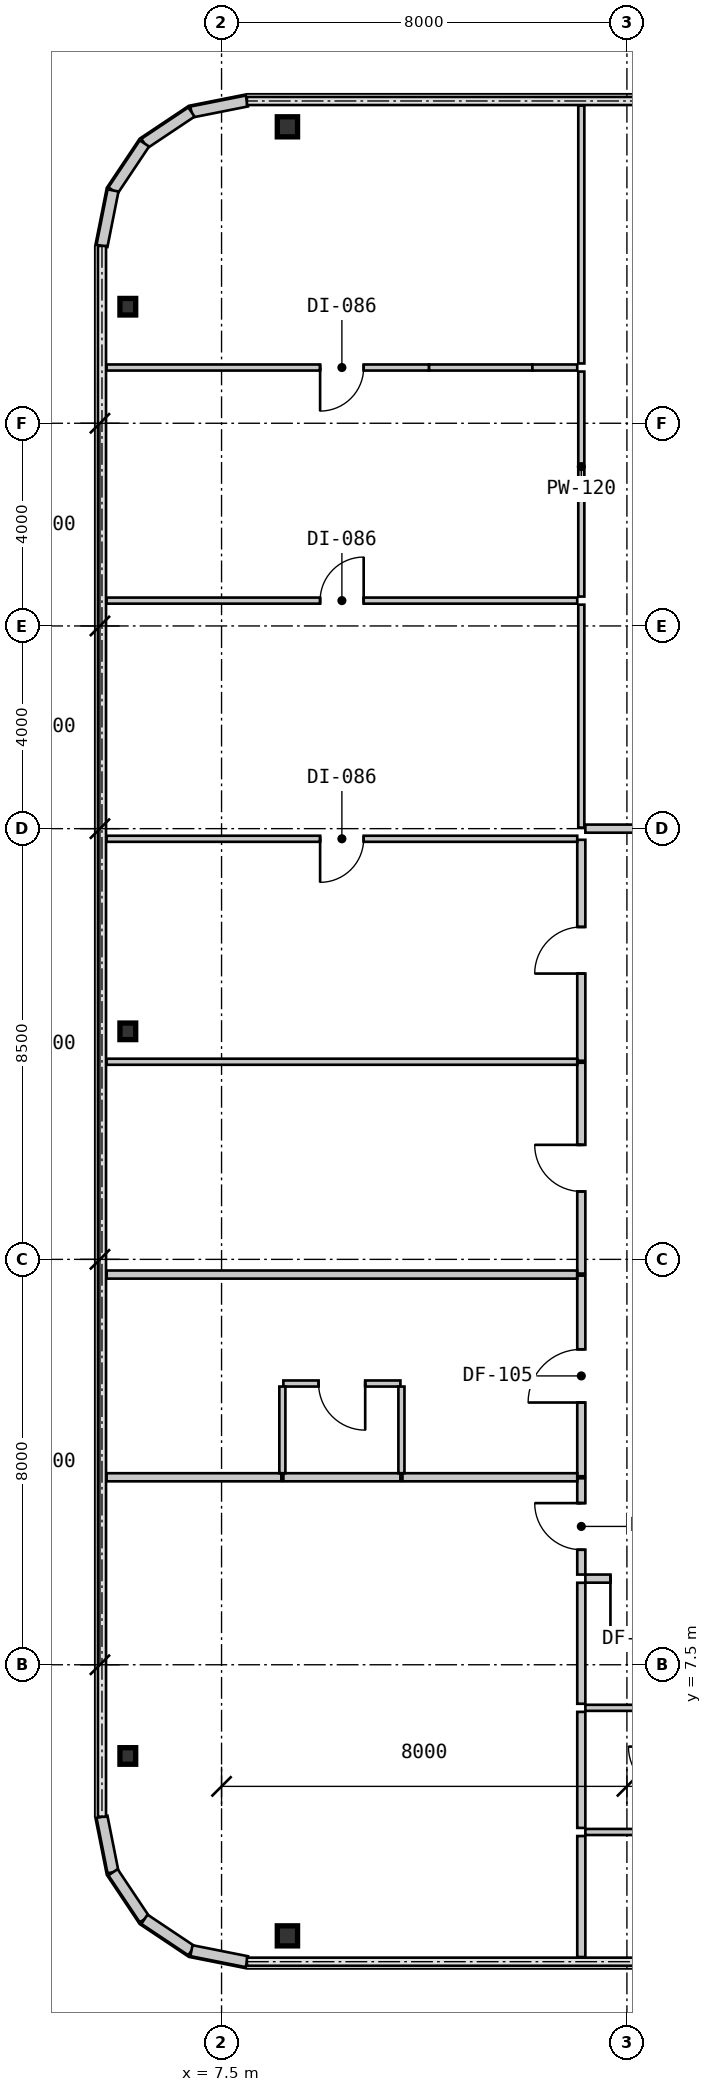
"""IFC4 building model, lengths in metres.
Left out: names, types, materials, properties, quantities, classifications, styles, units other than length and angle.
Written with IfcOpenShell. Run it as: python <this file> out.ifc"""

import sys

from ifc_helpers import new_model, si_unit, direction, frame, frame_2d, origin, origin_2d, place, context, subcontext, project, spatial, rectangle, i_section, extrude, source, transform, mapped, element, fill, save


model = new_model("IFC4")
c1 = context("Model", 3, precision=1e-05, world=origin(), true_north=direction((0.0, 1.0)))
c2 = subcontext(c1, "Body", "Model", "MODEL_VIEW")
j1 = project(units=[si_unit("LENGTHUNIT", "METRE"), si_unit("PLANEANGLEUNIT", "RADIAN")], contexts=[c1])
p1 = place(None, origin())
s1 = spatial("IfcSite", under=j1, at=p1, CompositionType="ELEMENT")
p2 = place(p1, origin())
s2 = spatial("IfcBuilding", under=s1, at=p2, CompositionType="ELEMENT")
p3 = place(p2, frame((0.0, 0.0, 19.95)))
s3 = spatial("IfcBuildingStorey", under=s2, at=p3, CompositionType="ELEMENT", Elevation=19.95)
m1 = source(origin(), c2, "Body", "SweptSolid", [
    extrude(i_section(OverallWidth=0.4, OverallDepth=0.396, WebThickness=0.022, FlangeThickness=0.034, at=origin_2d()), origin(), (0.0, 0.0, 1.0), 3.15),
])
for number, where, z_axis, x_axis in (
    (1, (8.8, 2.15, 0.0), (0.0, 0.0, 1.0), (1.0, 0.0, 0.0)),
    (2, (8.8, 37.85, 0.0), (0.0, 0.0, 1.0), (1.0, 0.0, 0.0)),
):
    element("IfcColumn", number, at=place(p3, frame(where, z_axis=z_axis, x_axis=x_axis)), inside=s3, PredefinedType="COLUMN", context=c2, shape_type="MappedRepresentation", body=[
        mapped(m1, transform((0.0, 0.0, 0.0), scale=1.0)),
    ])
m2 = source(origin(), c2, "Body", "SweptSolid", [
    extrude(i_section(OverallWidth=0.311, OverallDepth=0.327, WebThickness=0.016, FlangeThickness=0.025, at=origin_2d()), origin(), (0.0, 0.0, 1.0), 3.15),
])
for number, where, z_axis, x_axis in (
    (3, (5.65, 5.7, 0.0), (0.0, 0.0, 1.0), (1.0, 0.0, 0.0)),
    (4, (5.65, 20.0, 0.0), (0.0, 0.0, 1.0), (1.0, 0.0, 0.0)),
    (5, (5.65, 34.3, 0.0), (0.0, 0.0, 1.0), (1.0, 0.0, 0.0)),
):
    element("IfcColumn", number, at=place(p3, frame(where, z_axis=z_axis, x_axis=x_axis)), inside=s3, PredefinedType="COLUMN", context=c2, shape_type="MappedRepresentation", body=[
        mapped(m2, transform((0.0, 0.0, 0.0), scale=1.0)),
    ])
m3 = source(origin(), c2, "Body", "SweptSolid", [
    extrude(rectangle(XDim=1.116, YDim=0.22, at=frame_2d((0.558, 0.0))), origin(), (0.0, 0.0, 1.0), 2.93),
])
for number, where, z_axis, x_axis in (
    (6, (8.0, 38.36, 0.0), (0.0, 0.0, 1.0), (-0.981, -0.195, 0.0)),
    (7, (6.906, 38.142, 0.0), (0.0, 0.0, 1.0), (-0.831, -0.556, 0.0)),
    (8, (5.978, 37.522, 0.0), (0.0, 0.0, 1.0), (-0.556, -0.831, 0.0)),
    (9, (5.358, 36.594, 0.0), (0.0, 0.0, 1.0), (-0.195, -0.981, 0.0)),
    (10, (5.14, 4.5, 0.0), (0.0, 0.0, 1.0), (0.195, -0.981, 0.0)),
    (11, (5.358, 3.406, 0.0), (0.0, 0.0, 1.0), (0.556, -0.831, 0.0)),
    (12, (5.978, 2.478, 0.0), (0.0, 0.0, 1.0), (0.831, -0.556, 0.0)),
    (13, (6.906, 1.858, 0.0), (0.0, 0.0, 1.0), (0.981, -0.195, 0.0)),
):
    element("IfcWall", number, at=place(p3, frame(where, z_axis=z_axis, x_axis=x_axis)), inside=s3, PredefinedType="SOLIDWALL", context=c2, shape_type="MappedRepresentation", body=[
        mapped(m3, transform((0.0, 0.0, 0.0), scale=1.0)),
    ])
m4 = source(origin(), c2, "Body", "SweptSolid", [
    extrude(rectangle(XDim=2.04, YDim=0.16, at=frame_2d((1.02, 0.0))), origin(), (0.0, 0.0, 1.0), 2.93),
])
p4 = place(p3, frame((16.72, 9.2, 0.0), z_axis=(0.0, 0.0, 1.0), x_axis=(-1.0, 0.0, 0.0)))
e14 = element("IfcWall", 14, at=p4, inside=s3, PredefinedType="PARTITIONING", context=c2, shape_type="MappedRepresentation", body=[
    mapped(m4, transform((0.0, 0.0, 0.0), scale=1.0)),
])
m5 = source(origin(), c2, "Body", "SweptSolid", [
    extrude(rectangle(XDim=1.05, YDim=2.1, at=frame_2d((0.525, 1.05))), frame((0.0, 0.09, 0.0), z_axis=(0.0, -1.0, 0.0), x_axis=(1.0, 0.0, 0.0)), (0.0, 0.0, 1.0), 0.18),
])
p5 = place(p4, frame((0.495, 0.0, 0.0)))
e15 = element("IfcOpeningElement", 15, at=p5, cuts=e14, PredefinedType="OPENING", context=c2, shape_type="MappedRepresentation", body=[
    mapped(m5, transform((0.0, 0.0, 0.0), scale=1.0)),
])
m6 = source(origin(), c2, "Body", "SweptSolid", [
    extrude(rectangle(XDim=1.9, YDim=0.16, at=frame_2d((0.95, 0.0))), origin(), (0.0, 0.0, 1.0), 2.93),
])
p6 = place(p3, frame((14.6, 9.28, 0.0), z_axis=(0.0, 0.0, 1.0), x_axis=(0.0, 1.0, 0.0)))
e16 = element("IfcWall", 16, at=p6, inside=s3, PredefinedType="PARTITIONING", context=c2, shape_type="MappedRepresentation", body=[
    mapped(m6, transform((0.0, 0.0, 0.0), scale=1.0)),
])
m7 = source(origin(), c2, "Body", "SweptSolid", [
    extrude(rectangle(XDim=0.92, YDim=2.1, at=frame_2d((0.46, 1.05))), frame((0.0, 0.09, 0.0), z_axis=(0.0, -1.0, 0.0), x_axis=(1.0, 0.0, 0.0)), (0.0, 0.0, 1.0), 0.18),
])
p7 = place(p6, frame((0.49, 0.0, 0.0)))
e17 = element("IfcOpeningElement", 17, at=p7, cuts=e16, PredefinedType="OPENING", context=c2, shape_type="MappedRepresentation", body=[
    mapped(m7, transform((0.0, 0.0, 0.0), scale=1.0)),
])
m8 = source(origin(), c2, "Body", "SweptSolid", [
    extrude(rectangle(XDim=3.959, YDim=0.16, at=frame_2d((1.98, 0.0))), origin(), (0.0, 0.0, 1.0), 2.93),
])
p8 = place(p3, frame((14.6, 11.22, 0.0), z_axis=(0.0, 0.0, 1.0), x_axis=(0.0, 1.0, 0.0)))
e18 = element("IfcWall", 18, at=p8, inside=s3, PredefinedType="PARTITIONING", context=c2, shape_type="MappedRepresentation", body=[
    mapped(m8, transform((0.0, 0.0, 0.0), scale=1.0)),
])
p9 = place(p8, frame((1.455, 0.0, 0.0)))
e19 = element("IfcOpeningElement", 19, at=p9, cuts=e18, PredefinedType="OPENING", context=c2, shape_type="MappedRepresentation", body=[
    mapped(m5, transform((0.0, 0.0, 0.0), scale=1.0)),
])
m9 = source(origin(), c2, "Body", "SweptSolid", [
    extrude(rectangle(XDim=4.16, YDim=0.16, at=frame_2d((2.08, 0.0))), origin(), (0.0, 0.0, 1.0), 2.93),
])
p10 = place(p3, frame((14.6, 15.22, 0.0), z_axis=(0.0, 0.0, 1.0), x_axis=(0.0, 1.0, 0.0)))
e20 = element("IfcWall", 20, at=p10, inside=s3, PredefinedType="PARTITIONING", context=c2, shape_type="MappedRepresentation", body=[
    mapped(m9, transform((0.0, 0.0, 0.0), scale=1.0)),
])
p11 = place(p10, frame((1.62, 0.0, 0.0)))
e21 = element("IfcOpeningElement", 21, at=p11, cuts=e20, PredefinedType="OPENING", context=c2, shape_type="MappedRepresentation", body=[
    mapped(m7, transform((0.0, 0.0, 0.0), scale=1.0)),
])
m10 = source(origin(), c2, "Body", "SweptSolid", [
    extrude(rectangle(XDim=4.36, YDim=0.16, at=frame_2d((2.18, 0.0))), origin(), (0.0, 0.0, 1.0), 2.93),
])
p12 = place(p3, frame((14.6, 19.42, 0.0), z_axis=(0.0, 0.0, 1.0), x_axis=(0.0, 1.0, 0.0)))
e22 = element("IfcWall", 22, at=p12, inside=s3, PredefinedType="PARTITIONING", context=c2, shape_type="MappedRepresentation", body=[
    mapped(m10, transform((0.0, 0.0, 0.0), scale=1.0)),
])
p13 = place(p12, frame((1.72, 0.0, 0.0)))
e23 = element("IfcOpeningElement", 23, at=p13, cuts=e22, PredefinedType="OPENING", context=c2, shape_type="MappedRepresentation", body=[
    mapped(m7, transform((0.0, 0.0, 0.0), scale=1.0)),
])
m11 = source(origin(), c2, "Body", "SweptSolid", [
    extrude(rectangle(XDim=4.13, YDim=0.16, at=frame_2d((2.065, 0.0))), origin(), (0.0, 0.0, 1.0), 2.93),
])
p14 = place(p3, frame((14.68, 24.0, 0.0), z_axis=(0.0, 0.0, 1.0), x_axis=(1.0, 0.0, 0.0)))
e24 = element("IfcWall", 24, at=p14, inside=s3, PredefinedType="PARTITIONING", context=c2, shape_type="MappedRepresentation", body=[
    mapped(m11, transform((0.0, 0.0, 0.0), scale=1.0)),
])
p15 = place(p14, frame((1.69, 0.0, 0.0)))
e25 = element("IfcOpeningElement", 25, at=p15, cuts=e24, PredefinedType="OPENING", context=c2, shape_type="MappedRepresentation", body=[
    mapped(m7, transform((0.0, 0.0, 0.0), scale=1.0)),
])
m12 = source(origin(), c2, "Body", "SweptSolid", [
    extrude(rectangle(XDim=1.75, YDim=0.12, at=frame_2d((0.875, 0.0))), origin(), (0.0, 0.0, 1.0), 2.93),
])
for number, where, z_axis, x_axis in (
    (26, (14.68, 4.2, 0.0), (0.0, 0.0, 1.0), (1.0, 0.0, 0.0)),
    (27, (16.43, 6.65, 0.0), (0.0, 0.0, 1.0), (-1.0, 0.0, 0.0)),
):
    element("IfcWall", number, at=place(p3, frame(where, z_axis=z_axis, x_axis=x_axis)), inside=s3, PredefinedType="PARTITIONING", context=c2, shape_type="MappedRepresentation", body=[
        mapped(m12, transform((0.0, 0.0, 0.0), scale=1.0)),
    ])
m13 = source(origin(), c2, "Body", "SweptSolid", [
    extrude(rectangle(XDim=2.388, YDim=0.16, at=frame_2d((1.194, 0.0))), origin(), (0.0, 0.0, 1.0), 2.93),
])
p16 = place(p3, frame((14.6, 1.732, 0.0), z_axis=(0.0, 0.0, 1.0), x_axis=(0.0, 1.0, 0.0)))
e28 = element("IfcWall", 28, at=p16, inside=s3, PredefinedType="PARTITIONING", context=c2, shape_type="MappedRepresentation", body=[
    mapped(m13, transform((0.0, 0.0, 0.0), scale=1.0)),
])
m14 = source(origin(), c2, "Body", "SweptSolid", [
    extrude(rectangle(XDim=2.388, YDim=0.16, at=frame_2d((1.194, 0.0))), origin(), (0.0, 0.0, 1.0), 2.93),
])
p17 = place(p3, frame((14.6, 6.73, 0.0), z_axis=(0.0, 0.0, 1.0), x_axis=(0.0, 1.0, 0.0)))
e29 = element("IfcWall", 29, at=p17, inside=s3, PredefinedType="PARTITIONING", context=c2, shape_type="MappedRepresentation", body=[
    mapped(m14, transform((0.0, 0.0, 0.0), scale=1.0)),
])
m15 = source(origin(), c2, "Body", "SweptSolid", [
    extrude(rectangle(XDim=2.29, YDim=0.16, at=frame_2d((1.145, 0.0))), origin(), (0.0, 0.0, 1.0), 2.93),
])
p18 = place(p3, frame((14.6, 4.28, 0.0), z_axis=(0.0, 0.0, 1.0), x_axis=(0.0, 1.0, 0.0)))
e30 = element("IfcWall", 30, at=p18, inside=s3, PredefinedType="PARTITIONING", context=c2, shape_type="MappedRepresentation", body=[
    mapped(m15, transform((0.0, 0.0, 0.0), scale=1.0)),
])
m16 = source(origin(), c2, "Body", "SweptSolid", [
    extrude(rectangle(XDim=3.45, YDim=0.16, at=frame_2d((1.725, 0.0))), origin(), (0.0, 0.0, 1.0), 2.93),
])
for number, where, z_axis, x_axis in (
    (31, (5.23, 11.2, 0.0), (0.0, 0.0, 1.0), (1.0, 0.0, 0.0)),
    (32, (11.07, 11.2, 0.0), (0.0, 0.0, 1.0), (1.0, 0.0, 0.0)),
):
    element("IfcWall", number, at=place(p3, frame(where, z_axis=z_axis, x_axis=x_axis)), inside=s3, PredefinedType="PARTITIONING", context=c2, shape_type="MappedRepresentation", body=[
        mapped(m16, transform((0.0, 0.0, 0.0), scale=1.0)),
    ])
m17 = source(origin(), c2, "Body", "SweptSolid", [
    extrude(rectangle(XDim=2.31, YDim=0.16, at=frame_2d((1.155, 0.0))), origin(), (0.0, 0.0, 1.0), 2.93),
])
p19 = place(p3, frame((8.72, 11.2, 0.0), z_axis=(0.0, 0.0, 1.0), x_axis=(1.0, 0.0, 0.0)))
e33 = element("IfcWall", 33, at=p19, inside=s3, PredefinedType="PARTITIONING", context=c2, shape_type="MappedRepresentation", body=[
    mapped(m17, transform((0.0, 0.0, 0.0), scale=1.0)),
])
m18 = source(origin(), c2, "Body", "SweptSolid", [
    extrude(rectangle(XDim=2.31, YDim=0.12, at=frame_2d((1.155, 0.0))), origin(), (0.0, 0.0, 1.0), 2.93),
])
p20 = place(p3, frame((11.03, 13.05, 0.0), z_axis=(0.0, 0.0, 1.0), x_axis=(-1.0, 0.0, 0.0)))
e34 = element("IfcWall", 34, at=p20, inside=s3, PredefinedType="PARTITIONING", context=c2, shape_type="MappedRepresentation", body=[
    mapped(m18, transform((0.0, 0.0, 0.0), scale=1.0)),
])
m19 = source(origin(), c2, "Body", "SweptSolid", [
    extrude(rectangle(XDim=0.92, YDim=2.1, at=frame_2d((0.46, 1.05))), frame((0.0, 0.07, 0.0), z_axis=(0.0, -1.0, 0.0), x_axis=(1.0, 0.0, 0.0)), (0.0, 0.0, 1.0), 0.14),
])
p21 = place(p20, frame((0.695, 0.0, 0.0)))
e35 = element("IfcOpeningElement", 35, at=p21, cuts=e34, PredefinedType="OPENING", context=c2, shape_type="MappedRepresentation", body=[
    mapped(m19, transform((0.0, 0.0, 0.0), scale=1.0)),
])
m20 = source(origin(), c2, "Body", "SweptSolid", [
    extrude(rectangle(XDim=1.71, YDim=0.12, at=frame_2d((0.855, 0.0))), origin(), (0.0, 0.0, 1.0), 2.93),
])
for number, where, z_axis, x_axis in (
    (36, (8.7, 12.99, 0.0), (0.0, 0.0, 1.0), (0.0, -1.0, 0.0)),
    (37, (11.05, 11.28, 0.0), (0.0, 0.0, 1.0), (0.0, 1.0, 0.0)),
):
    element("IfcWall", number, at=place(p3, frame(where, z_axis=z_axis, x_axis=x_axis)), inside=s3, PredefinedType="PARTITIONING", context=c2, shape_type="MappedRepresentation", body=[
        mapped(m20, transform((0.0, 0.0, 0.0), scale=1.0)),
    ])
m21 = source(origin(), c2, "Body", "SweptSolid", [
    extrude(rectangle(XDim=9.286, YDim=0.16, at=frame_2d((4.643, 0.0))), origin(), (0.0, 0.0, 1.0), 2.93),
])
p22 = place(p3, frame((5.232, 15.2, 0.0), z_axis=(0.0, 0.0, 1.0), x_axis=(1.0, 0.0, 0.0)))
e38 = element("IfcWall", 38, at=p22, inside=s3, PredefinedType="PARTITIONING", context=c2, shape_type="MappedRepresentation", body=[
    mapped(m21, transform((0.0, 0.0, 0.0), scale=1.0)),
])
m22 = source(origin(), c2, "Body", "SweptSolid", [
    extrude(rectangle(XDim=9.29, YDim=0.12, at=frame_2d((4.645, 0.0))), origin(), (0.0, 0.0, 1.0), 2.93),
])
p23 = place(p3, frame((5.23, 19.4, 0.0), z_axis=(0.0, 0.0, 1.0), x_axis=(1.0, 0.0, 0.0)))
e39 = element("IfcWall", 39, at=p23, inside=s3, PredefinedType="PARTITIONING", context=c2, shape_type="MappedRepresentation", body=[
    mapped(m22, transform((0.0, 0.0, 0.0), scale=1.0)),
])
p24 = place(p3, frame((5.23, 23.8, 0.0), z_axis=(0.0, 0.0, 1.0), x_axis=(1.0, 0.0, 0.0)))
e40 = element("IfcWall", 40, at=p24, inside=s3, PredefinedType="PARTITIONING", context=c2, shape_type="MappedRepresentation", body=[
    mapped(m22, transform((0.0, 0.0, 0.0), scale=1.0)),
])
m23 = source(origin(), c2, "Body", "SweptSolid", [
    extrude(rectangle(XDim=0.86, YDim=2.1, at=frame_2d((0.43, 1.05))), frame((0.0, 0.07, 0.0), z_axis=(0.0, -1.0, 0.0), x_axis=(1.0, 0.0, 0.0)), (0.0, 0.0, 1.0), 0.14),
])
p25 = place(p24, frame((4.215, 0.0, 0.0)))
e41 = element("IfcOpeningElement", 41, at=p25, cuts=e40, PredefinedType="OPENING", context=c2, shape_type="MappedRepresentation", body=[
    mapped(m23, transform((0.0, 0.0, 0.0), scale=1.0)),
])
p26 = place(p3, frame((5.23, 28.5, 0.0), z_axis=(0.0, 0.0, 1.0), x_axis=(1.0, 0.0, 0.0)))
e42 = element("IfcWall", 42, at=p26, inside=s3, PredefinedType="PARTITIONING", context=c2, shape_type="MappedRepresentation", body=[
    mapped(m22, transform((0.0, 0.0, 0.0), scale=1.0)),
])
p27 = place(p26, frame((4.215, 0.0, 0.0)))
e43 = element("IfcOpeningElement", 43, at=p27, cuts=e42, PredefinedType="OPENING", context=c2, shape_type="MappedRepresentation", body=[
    mapped(m23, transform((0.0, 0.0, 0.0), scale=1.0)),
])
m24 = source(origin(), c2, "Body", "SweptSolid", [
    extrude(rectangle(XDim=4.4, YDim=0.12, at=frame_2d((2.2, 0.0))), origin(), (0.0, 0.0, 1.0), 2.93),
])
p28 = place(p3, frame((14.6, 28.42, 0.0), z_axis=(0.0, 0.0, 1.0), x_axis=(0.0, -1.0, 0.0)))
e44 = element("IfcWall", 44, at=p28, inside=s3, PredefinedType="PARTITIONING", context=c2, shape_type="MappedRepresentation", body=[
    mapped(m24, transform((0.0, 0.0, 0.0), scale=1.0)),
])
m25 = source(origin(), c2, "Body", "SweptSolid", [
    extrude(rectangle(XDim=6.365, YDim=0.12, at=frame_2d((3.183, 0.0))), origin(), (0.0, 0.0, 1.0), 2.93),
])
p29 = place(p3, frame((5.23, 33.1, 0.0), z_axis=(0.0, 0.0, 1.0), x_axis=(1.0, 0.0, 0.0)))
e45 = element("IfcWall", 45, at=p29, inside=s3, PredefinedType="PARTITIONING", context=c2, shape_type="MappedRepresentation", body=[
    mapped(m25, transform((0.0, 0.0, 0.0), scale=1.0)),
])
p30 = place(p29, frame((4.215, 0.0, 0.0)))
e46 = element("IfcOpeningElement", 46, at=p30, cuts=e45, PredefinedType="OPENING", context=c2, shape_type="MappedRepresentation", body=[
    mapped(m23, transform((0.0, 0.0, 0.0), scale=1.0)),
])
m26 = source(origin(), c2, "Body", "SweptSolid", [
    extrude(rectangle(XDim=2.04, YDim=0.12, at=frame_2d((1.02, 0.0))), origin(), (0.0, 0.0, 1.0), 2.328),
])
p31 = place(p3, frame((11.595, 33.1, 0.0), z_axis=(0.0, 0.0, 1.0), x_axis=(1.0, 0.0, 0.0)))
e47 = element("IfcWall", 47, at=p31, inside=s3, PredefinedType="PARTITIONING", context=c2, shape_type="MappedRepresentation", body=[
    mapped(m26, transform((0.0, 0.0, 0.0), scale=1.0)),
])
m27 = source(origin(), c2, "Body", "SweptSolid", [
    extrude(rectangle(XDim=0.885, YDim=0.12, at=frame_2d((0.442, 0.0))), origin(), (0.0, 0.0, 1.0), 2.93),
])
p32 = place(p3, frame((13.635, 33.1, 0.0), z_axis=(0.0, 0.0, 1.0), x_axis=(1.0, 0.0, 0.0)))
e48 = element("IfcWall", 48, at=p32, inside=s3, PredefinedType="PARTITIONING", context=c2, shape_type="MappedRepresentation", body=[
    mapped(m27, transform((0.0, 0.0, 0.0), scale=1.0)),
])
m28 = source(origin(), c2, "Body", "SweptSolid", [
    extrude(rectangle(XDim=4.44, YDim=0.12, at=frame_2d((2.22, 0.0))), origin(), (0.0, 0.0, 1.0), 2.93),
])
p33 = place(p3, frame((14.6, 33.02, 0.0), z_axis=(0.0, 0.0, 1.0), x_axis=(0.0, -1.0, 0.0)))
e49 = element("IfcWall", 49, at=p33, inside=s3, PredefinedType="PARTITIONING", context=c2, shape_type="MappedRepresentation", body=[
    mapped(m28, transform((0.0, 0.0, 0.0), scale=1.0)),
])
m29 = source(origin(), c2, "Body", "SweptSolid", [
    extrude(rectangle(XDim=5.09, YDim=0.12, at=frame_2d((2.545, 0.0))), origin(), (0.0, 0.0, 1.0), 2.93),
])
p34 = place(p3, frame((14.6, 38.27, 0.0), z_axis=(0.0, 0.0, 1.0), x_axis=(0.0, -1.0, 0.0)))
e50 = element("IfcWall", 50, at=p34, inside=s3, PredefinedType="PARTITIONING", context=c2, shape_type="MappedRepresentation", body=[
    mapped(m29, transform((0.0, 0.0, 0.0), scale=1.0)),
])
m30 = source(origin(), c2, "Body", "SweptSolid", [
    extrude(rectangle(XDim=1.05, YDim=2.1, at=frame_2d((0.525, 1.05))), frame((0.0, 0.025, 0.0), z_axis=(0.0, -1.0, 0.0), x_axis=(1.0, 0.0, 0.0)), (0.0, 0.0, 1.0), 0.05),
])
p35 = place(p5, origin())
e51 = element("IfcDoor", 51, at=p35, inside=s3, OperationType="SINGLE_SWING_RIGHT", PredefinedType="DOOR", context=c2, shape_type="MappedRepresentation", body=[
    mapped(m30, transform((0.0, 0.0, 0.0), scale=1.0)),
])
fill(e15, e51)
m31 = source(origin(), c2, "Body", "SweptSolid", [
    extrude(rectangle(XDim=0.92, YDim=2.1, at=frame_2d((0.46, 1.05))), frame((0.0, 0.025, 0.0), z_axis=(0.0, -1.0, 0.0), x_axis=(1.0, 0.0, 0.0)), (0.0, 0.0, 1.0), 0.05),
])
p36 = place(p7, origin())
e52 = element("IfcDoor", 52, at=p36, inside=s3, OperationType="SINGLE_SWING_RIGHT", PredefinedType="DOOR", context=c2, shape_type="MappedRepresentation", body=[
    mapped(m31, transform((0.0, 0.0, 0.0), scale=1.0)),
])
fill(e17, e52)
p37 = place(p9, origin())
e53 = element("IfcDoor", 53, at=p37, inside=s3, OperationType="SINGLE_SWING_LEFT", PredefinedType="DOOR", context=c2, shape_type="MappedRepresentation", body=[
    mapped(m30, transform((0.0, 0.0, 0.0), scale=1.0)),
])
fill(e19, e53)
p38 = place(p11, origin())
e54 = element("IfcDoor", 54, at=p38, inside=s3, OperationType="SINGLE_SWING_RIGHT", PredefinedType="DOOR", context=c2, shape_type="MappedRepresentation", body=[
    mapped(m31, transform((0.0, 0.0, 0.0), scale=1.0)),
])
fill(e21, e54)
p39 = place(p13, origin())
e55 = element("IfcDoor", 55, at=p39, inside=s3, OperationType="SINGLE_SWING_LEFT", PredefinedType="DOOR", context=c2, shape_type="MappedRepresentation", body=[
    mapped(m31, transform((0.0, 0.0, 0.0), scale=1.0)),
])
fill(e23, e55)
p40 = place(p21, origin())
e56 = element("IfcDoor", 56, at=p40, inside=s3, OperationType="SINGLE_SWING_LEFT", PredefinedType="DOOR", context=c2, shape_type="MappedRepresentation", body=[
    mapped(m31, transform((0.0, 0.0, 0.0), scale=1.0)),
])
fill(e35, e56)
m32 = source(origin(), c2, "Body", "SweptSolid", [
    extrude(rectangle(XDim=0.86, YDim=2.1, at=frame_2d((0.43, 1.05))), frame((0.0, 0.025, 0.0), z_axis=(0.0, -1.0, 0.0), x_axis=(1.0, 0.0, 0.0)), (0.0, 0.0, 1.0), 0.05),
])
p41 = place(p25, frame((0.86, 0.0, 0.0), z_axis=(0.0, 0.0, 1.0), x_axis=(-1.0, 0.0, 0.0)))
e57 = element("IfcDoor", 57, at=p41, inside=s3, OperationType="SINGLE_SWING_RIGHT", PredefinedType="DOOR", context=c2, shape_type="MappedRepresentation", body=[
    mapped(m32, transform((0.0, 0.0, 0.0), scale=1.0)),
])
fill(e41, e57)
p42 = place(p27, origin())
e58 = element("IfcDoor", 58, at=p42, inside=s3, OperationType="SINGLE_SWING_RIGHT", PredefinedType="DOOR", context=c2, shape_type="MappedRepresentation", body=[
    mapped(m32, transform((0.0, 0.0, 0.0), scale=1.0)),
])
fill(e43, e58)
p43 = place(p30, frame((0.86, 0.0, 0.0), z_axis=(0.0, 0.0, 1.0), x_axis=(-1.0, 0.0, 0.0)))
e59 = element("IfcDoor", 59, at=p43, inside=s3, OperationType="SINGLE_SWING_RIGHT", PredefinedType="DOOR", context=c2, shape_type="MappedRepresentation", body=[
    mapped(m32, transform((0.0, 0.0, 0.0), scale=1.0)),
])
fill(e46, e59)
save(model, sys.argv[1])
